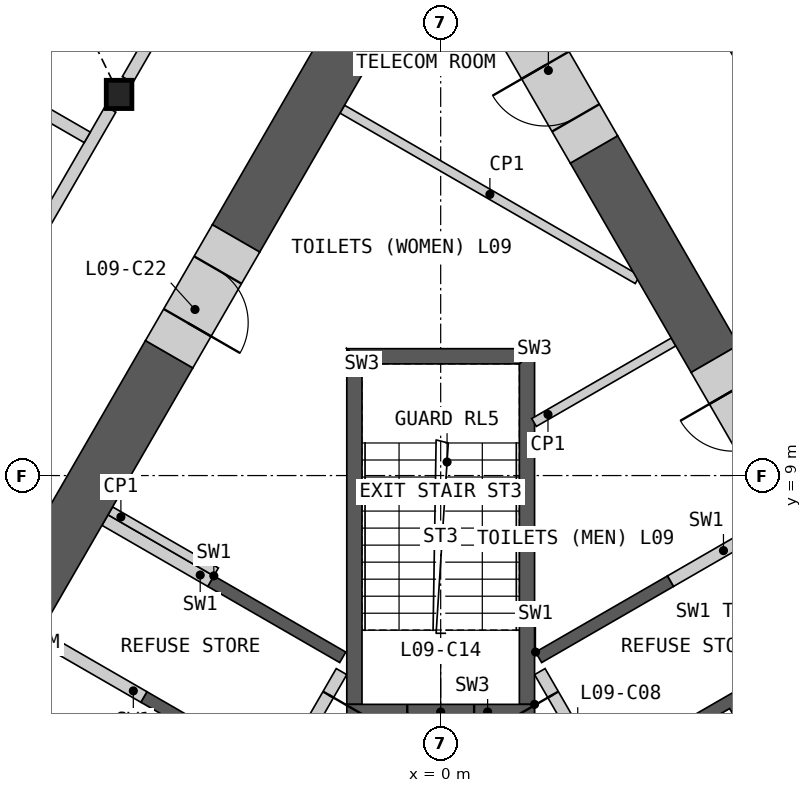
"""IFC4 building model, lengths in metres.
Left out: names, types, materials, properties, quantities, classifications, styles, units other than length and angle.
Written with IfcOpenShell. Run it as: python <this file> out.ifc"""

import sys

from ifc_helpers import new_model, si_unit, direction, frame, frame_2d, origin, origin_2d, place, context, subcontext, project, spatial, polyline, rectangle, i_section, outline, extrude, element, fill, save


model = new_model("IFC4")
c1 = context("Model", 3, precision=1e-05, world=origin(), true_north=direction((0.0, 1.0)))
c2 = subcontext(c1, "Body", "Model", "MODEL_VIEW")
j1 = project(units=[si_unit("LENGTHUNIT", "METRE"), si_unit("PLANEANGLEUNIT", "RADIAN")], contexts=[c1])
p1 = place(None, origin())
s1 = spatial("IfcSite", under=j1, at=p1, CompositionType="ELEMENT")
p2 = place(p1, origin())
s2 = spatial("IfcBuilding", under=s1, at=p2, CompositionType="ELEMENT")
p3 = place(p2, frame((0.0, 0.0, 46.8)))
s3 = spatial("IfcBuildingStorey", under=s2, at=p3, CompositionType="ELEMENT", Elevation=46.8)
p4 = place(p3, frame((-5.289, 15.269, 0.0), z_axis=(0.0, 0.0, 1.0), x_axis=(1.0, 0.0, 0.0)))
e1 = element("IfcColumn", 1, at=p4, inside=s3, PredefinedType="COLUMN", context=c2, shape_type="SweptSolid", body=[
    extrude(i_section(OverallWidth=0.421, OverallDepth=0.465, WebThickness=0.045, FlangeThickness=0.072, at=origin_2d()), origin(), (0.0, 0.0, 1.0), 4.2),
])
p5 = place(p3, origin())
e2 = element("IfcWall", 2, at=p5, inside=s3, PredefinedType="SHEAR", context=c2, shape_type="SweptSolid", body=[
    extrude(outline(polyline([(1.561, 6.097), (3.731, 7.35), (3.831, 7.177), (1.66, 5.924), (1.561, 6.097)])), origin(), (0.0, 0.0, 1.0), 3.8),
])
p6 = place(p3, origin())
e3 = element("IfcWall", 3, at=p6, inside=s3, PredefinedType="SHEAR", context=c2, shape_type="SweptSolid", body=[
    extrude(outline(polyline([(2.66, 4.192), (4.831, 5.445), (8.231, -0.444), (6.061, -1.697), (5.96, -1.524), (7.952, -0.374), (6.952, 1.358), (4.96, 0.208), (4.861, 0.381), (6.852, 1.531), (5.852, 3.263), (3.861, 2.113), (3.76, 2.287), (5.752, 3.437), (4.752, 5.169), (2.76, 4.019), (2.66, 4.192)])), origin(), (0.0, 0.0, 1.0), 3.8),
])
p7 = place(p3, frame((5.817, -1.476, 0.0), z_axis=(0.0, 0.0, 1.0), x_axis=(-0.500002616675, 0.866023893041, 0.0)))
e4 = element("IfcWall", 4, at=p7, inside=s3, PredefinedType="SOLIDWALL", context=c2, shape_type="SweptSolid", body=[
    extrude(rectangle(XDim=8.373, YDim=0.2, at=frame_2d((4.187, 0.0))), origin(), (0.0, 0.0, 1.0), 3.8),
])
p8 = place(p7, frame((0.337, 0.0, 0.0)))
e5 = element("IfcOpeningElement", 5, at=p8, cuts=e4, PredefinedType="OPENING", context=c2, shape_type="SweptSolid", body=[
    extrude(rectangle(XDim=1.1, YDim=2.1, at=frame_2d((0.55, 1.05))), frame((0.0, 0.11, 0.0), z_axis=(0.0, -1.0, 0.0), x_axis=(1.0, 0.0, 0.0)), (0.0, 0.0, 1.0), 0.22),
])
p9 = place(p7, frame((2.537, 0.0, 0.0)))
e6 = element("IfcOpeningElement", 6, at=p9, cuts=e4, PredefinedType="OPENING", context=c2, shape_type="SweptSolid", body=[
    extrude(rectangle(XDim=1.1, YDim=2.1, at=frame_2d((0.55, 1.05))), frame((0.0, 0.11, 0.0), z_axis=(0.0, -1.0, 0.0), x_axis=(1.0, 0.0, 0.0)), (0.0, 0.0, 1.0), 0.22),
])
p10 = place(p7, frame((4.737, 0.0, 0.0)))
e7 = element("IfcOpeningElement", 7, at=p10, cuts=e4, PredefinedType="OPENING", context=c2, shape_type="SweptSolid", body=[
    extrude(rectangle(XDim=1.1, YDim=2.1, at=frame_2d((0.55, 1.05))), frame((0.0, 0.11, 0.0), z_axis=(0.0, -1.0, 0.0), x_axis=(1.0, 0.0, 0.0)), (0.0, 0.0, 1.0), 0.22),
])
p11 = place(p7, frame((7.037, 0.0, 0.0)))
e8 = element("IfcOpeningElement", 8, at=p11, cuts=e4, PredefinedType="OPENING", context=c2, shape_type="SweptSolid", body=[
    extrude(rectangle(XDim=0.9, YDim=2.1, at=frame_2d((0.45, 1.05))), frame((0.0, 0.11, 0.0), z_axis=(0.0, -1.0, 0.0), x_axis=(1.0, 0.0, 0.0)), (0.0, 0.0, 1.0), 0.22),
])
p12 = place(p3, frame((3.781, 7.263, 0.0), z_axis=(0.0, 0.0, 1.0), x_axis=(0.865983199114, 0.50007309351, 0.0)))
e9 = element("IfcWall", 9, at=p12, inside=s3, PredefinedType="SHEAR", context=c2, shape_type="SweptSolid", body=[
    extrude(rectangle(XDim=2.009, YDim=0.2, at=frame_2d((1.004, 0.0))), origin(), (0.0, 0.0, 1.0), 3.8),
])
p13 = place(p3, origin())
e10 = element("IfcWall", 10, at=p13, inside=s3, PredefinedType="SHEAR", context=c2, shape_type="SweptSolid", body=[
    extrude(outline(polyline([(-2.76, 4.019), (-4.931, 5.272), (-4.831, 5.445), (-2.66, 4.192), (-2.76, 4.019)])), origin(), (0.0, 0.0, 1.0), 3.8),
])
p14 = place(p3, origin())
e11 = element("IfcWall", 11, at=p14, inside=s3, PredefinedType="SHEAR", context=c2, shape_type="SweptSolid", body=[
    extrude(outline(polyline([(-3.731, 7.35), (-1.561, 6.097), (-1.66, 5.924), (-3.831, 7.177), (-3.731, 7.35)])), origin(), (0.0, 0.0, 1.0), 3.8),
])
p15 = place(p3, frame((-1.631, 5.776, 0.0), z_axis=(0.0, 0.0, 1.0), x_axis=(-0.499992876559, -0.866029516466, 0.0)))
e12 = element("IfcWall", 12, at=p15, inside=s3, PredefinedType="SOLIDWALL", context=c2, shape_type="SweptSolid", body=[
    extrude(rectangle(XDim=6.486, YDim=0.2, at=frame_2d((3.243, 0.0))), origin(), (0.0, 0.0, 1.0), 3.8),
])
p16 = place(p15, frame((0.437, 0.0, 0.0)))
e13 = element("IfcOpeningElement", 13, at=p16, cuts=e12, PredefinedType="OPENING", context=c2, shape_type="SweptSolid", body=[
    extrude(rectangle(XDim=0.9, YDim=2.1, at=frame_2d((0.45, 1.05))), frame((0.0, 0.11, 0.0), z_axis=(0.0, -1.0, 0.0), x_axis=(1.0, 0.0, 0.0)), (0.0, 0.0, 1.0), 0.22),
])
p17 = place(p15, frame((2.637, 0.0, 0.0)))
e14 = element("IfcOpeningElement", 14, at=p17, cuts=e12, PredefinedType="OPENING", context=c2, shape_type="SweptSolid", body=[
    extrude(rectangle(XDim=0.9, YDim=2.1, at=frame_2d((0.45, 1.05))), frame((0.0, 0.11, 0.0), z_axis=(0.0, -1.0, 0.0), x_axis=(1.0, 0.0, 0.0)), (0.0, 0.0, 1.0), 0.22),
])
p18 = place(p3, frame((-3.781, 7.263, 0.0), z_axis=(0.0, 0.0, 1.0), x_axis=(-0.865983199114, 0.50007309351, 0.0)))
e15 = element("IfcWall", 15, at=p18, inside=s3, PredefinedType="SHEAR", context=c2, shape_type="SweptSolid", body=[
    extrude(rectangle(XDim=2.009, YDim=0.2, at=frame_2d((1.004, 0.0))), origin(), (0.0, 0.0, 1.0), 3.8),
])
p19 = place(p3, frame((-4.881, 5.358, 0.0), z_axis=(0.0, 0.0, 1.0), x_axis=(-0.866035824272, 0.499981950752, 0.0)))
e16 = element("IfcWall", 16, at=p19, inside=s3, PredefinedType="SHEAR", context=c2, shape_type="SweptSolid", body=[
    extrude(rectangle(XDim=2.009, YDim=0.2, at=frame_2d((1.004, 0.0))), origin(), (0.0, 0.0, 1.0), 3.8),
])
p20 = place(p3, origin())
e17 = element("IfcWall", 17, at=p20, inside=s3, PredefinedType="SHEAR", context=c2, shape_type="SweptSolid", body=[
    extrude(outline(polyline([(1.544, 5.237), (1.544, 11.087), (1.294, 10.837), (1.294, 5.237), (1.544, 5.237)])), origin(), (0.0, 0.0, 1.0), 3.8),
])
p21 = place(p3, origin())
e18 = element("IfcWall", 18, at=p21, inside=s3, PredefinedType="SHEAR", context=c2, shape_type="SweptSolid", body=[
    extrude(outline(polyline([(1.544, 11.087), (-1.544, 11.087), (-1.294, 10.837), (1.294, 10.837), (1.544, 11.087)])), origin(), (0.0, 0.0, 1.0), 3.8),
])
p22 = place(p3, origin())
e19 = element("IfcWall", 19, at=p22, inside=s3, PredefinedType="SHEAR", context=c2, shape_type="SweptSolid", body=[
    extrude(outline(polyline([(-1.294, 10.837), (-1.544, 11.087), (-1.544, 5.237), (-1.294, 5.237), (-1.294, 10.837)])), origin(), (0.0, 0.0, 1.0), 3.8),
])
p23 = place(p3, frame((1.544, 5.112, 0.0), z_axis=(0.0, 0.0, 1.0), x_axis=(-1.0, 0.0, 0.0)))
e20 = element("IfcWall", 20, at=p23, inside=s3, PredefinedType="SHEAR", context=c2, shape_type="SweptSolid", body=[
    extrude(rectangle(XDim=3.088, YDim=0.25, at=frame_2d((1.544, 0.0))), origin(), (0.0, 0.0, 1.0), 3.8),
])
p24 = place(p23, frame((0.994, 0.0, 0.0)))
e21 = element("IfcOpeningElement", 21, at=p24, cuts=e20, PredefinedType="OPENING", context=c2, shape_type="SweptSolid", body=[
    extrude(rectangle(XDim=1.1, YDim=2.1, at=frame_2d((0.55, 1.05))), frame((0.0, 0.135, 0.0), z_axis=(0.0, -1.0, 0.0), x_axis=(1.0, 0.0, 0.0)), (0.0, 0.0, 1.0), 0.27),
])
p25 = place(p3, frame((-3.693, 7.415, 0.0), z_axis=(0.0, 0.0, 1.0), x_axis=(-0.866035824272, 0.499981950752, 0.0)))
e22 = element("IfcWall", 22, at=p25, inside=s3, PredefinedType="PARTITIONING", context=c2, shape_type="SweptSolid", body=[
    extrude(rectangle(XDim=2.009, YDim=0.15, at=frame_2d((1.004, 0.0))), origin(), (0.0, 0.0, 1.0), 3.8),
])
p26 = place(p3, frame((3.829, 11.197, 0.0), z_axis=(0.0, 0.0, 1.0), x_axis=(-0.866016748302, -0.500014991436, 0.0)))
e23 = element("IfcWall", 23, at=p26, inside=s3, PredefinedType="PARTITIONING", context=c2, shape_type="SweptSolid", body=[
    extrude(rectangle(XDim=2.649, YDim=0.15, at=frame_2d((1.324, 0.0))), origin(), (0.0, 0.0, 1.0), 3.8),
])
p27 = place(p3, frame((-1.619, 15.026, 0.0), z_axis=(0.0, 0.0, 1.0), x_axis=(0.866015917575, -0.500016430238, 0.0)))
e24 = element("IfcWall", 24, at=p27, inside=s3, PredefinedType="PARTITIONING", context=c2, shape_type="SweptSolid", body=[
    extrude(rectangle(XDim=5.607, YDim=0.15, at=frame_2d((2.804, 0.0))), origin(), (0.0, 0.0, 1.0), 3.8),
])
p28 = place(p3, frame((4.509, 10.921, 0.0), z_axis=(0.0, 0.0, 1.0), x_axis=(-0.49999004381, 0.866031151917, 0.0)))
e25 = element("IfcWall", 25, at=p28, inside=s3, PredefinedType="SHEAR", context=c2, shape_type="SweptSolid", body=[
    extrude(rectangle(XDim=3.975, YDim=0.9, at=frame_2d((1.988, 0.0))), origin(), (0.0, 0.0, 1.0), 3.8),
])
p29 = place(p3, frame((-4.466, 10.995, 0.0), z_axis=(0.0, 0.0, 1.0), x_axis=(-0.500012427149, -0.866018228848, 0.0)))
e26 = element("IfcWall", 26, at=p29, inside=s3, PredefinedType="SHEAR", context=c2, shape_type="SweptSolid", body=[
    extrude(rectangle(XDim=7.409, YDim=0.9, at=frame_2d((3.705, 0.0))), origin(), (0.0, 0.0, 1.0), 3.8),
])
p30 = place(p3, frame((-0.39, 18.055, 0.0), z_axis=(0.0, 0.0, 1.0), x_axis=(-0.499981657175, -0.86603599376, 0.0)))
e27 = element("IfcWall", 27, at=p30, inside=s3, PredefinedType="SHEAR", context=c2, shape_type="SweptSolid", body=[
    extrude(rectangle(XDim=5.952, YDim=0.9, at=frame_2d((2.976, 0.0))), origin(), (0.0, 0.0, 1.0), 3.8),
])
p31 = place(p3, frame((5.608, 9.016, 0.0), z_axis=(0.0, 0.0, 1.0), x_axis=(-0.499994660107, 0.866028486751, 0.0)))
e28 = element("IfcWall", 28, at=p31, inside=s3, PredefinedType="SHEAR", context=c2, shape_type="SweptSolid", body=[
    extrude(rectangle(XDim=2.2, YDim=0.9, at=frame_2d((1.1, 0.0))), origin(), (0.0, 0.0, 1.0), 3.8),
])
p32 = place(p31, frame((0.6, 0.0, 0.0)))
e29 = element("IfcOpeningElement", 29, at=p32, cuts=e28, PredefinedType="OPENING", context=c2, shape_type="SweptSolid", body=[
    extrude(rectangle(XDim=1.0, YDim=2.1, at=frame_2d((0.5, 1.05))), frame((0.0, 0.46, 0.0), z_axis=(0.0, -1.0, 0.0), x_axis=(1.0, 0.0, 0.0)), (0.0, 0.0, 1.0), 0.92),
])
p33 = place(p3, frame((-3.365, 12.9, 0.0), z_axis=(0.0, 0.0, 1.0), x_axis=(-0.500077893725, -0.86598042715, 0.0)))
e30 = element("IfcWall", 30, at=p33, inside=s3, PredefinedType="SHEAR", context=c2, shape_type="SweptSolid", body=[
    extrude(rectangle(XDim=2.2, YDim=0.9, at=frame_2d((1.1, 0.0))), origin(), (0.0, 0.0, 1.0), 3.8),
])
p34 = place(p33, frame((0.6, 0.0, 0.0)))
e31 = element("IfcOpeningElement", 31, at=p34, cuts=e30, PredefinedType="OPENING", context=c2, shape_type="SweptSolid", body=[
    extrude(rectangle(XDim=1.0, YDim=2.1, at=frame_2d((0.5, 1.05))), frame((0.0, 0.46, 0.0), z_axis=(0.0, -1.0, 0.0), x_axis=(1.0, 0.0, 0.0)), (0.0, 0.0, 1.0), 0.92),
])
p35 = place(p3, frame((2.521, 14.364, 0.0), z_axis=(0.0, 0.0, 1.0), x_axis=(-0.50002983664, 0.866008176907, 0.0)))
e32 = element("IfcWall", 32, at=p35, inside=s3, PredefinedType="SHEAR", context=c2, shape_type="SweptSolid", body=[
    extrude(rectangle(XDim=2.2, YDim=0.9, at=frame_2d((1.1, 0.0))), origin(), (0.0, 0.0, 1.0), 3.8),
])
p36 = place(p35, frame((0.6, 0.0, 0.0)))
e33 = element("IfcOpeningElement", 33, at=p36, cuts=e32, PredefinedType="OPENING", context=c2, shape_type="SweptSolid", body=[
    extrude(rectangle(XDim=1.0, YDim=2.1, at=frame_2d((0.5, 1.05))), frame((0.0, 0.46, 0.0), z_axis=(0.0, -1.0, 0.0), x_axis=(1.0, 0.0, 0.0)), (0.0, 0.0, 1.0), 0.92),
])
p37 = place(p3, frame((-10.439, 6.35, 0.0), z_axis=(0.0, 0.0, 1.0), x_axis=(0.50001002959, 0.86601961312, 0.0)))
e34 = element("IfcWall", 34, at=p37, inside=s3, PredefinedType="PARTITIONING", context=c2, shape_type="SweptSolid", body=[
    extrude(rectangle(XDim=10.019, YDim=0.2, at=frame_2d((5.009, 0.0))), origin(), (0.0, 0.0, 1.0), 3.8),
])
p38 = place(p37, frame((4.159, 0.0, 0.0)))
e35 = element("IfcOpeningElement", 35, at=p38, cuts=e34, PredefinedType="OPENING", context=c2, shape_type="SweptSolid", body=[
    extrude(rectangle(XDim=1.0, YDim=2.1, at=frame_2d((0.5, 1.05))), frame((0.0, 0.11, 0.0), z_axis=(0.0, -1.0, 0.0), x_axis=(1.0, 0.0, 0.0)), (0.0, 0.0, 1.0), 0.22),
])
p39 = place(p3, frame((1.913, 21.116, 0.0), z_axis=(0.0, 0.0, 1.0), x_axis=(0.500001069878, -0.866024786089, 0.0)))
e36 = element("IfcWall", 36, at=p39, inside=s3, PredefinedType="PARTITIONING", context=c2, shape_type="SweptSolid", body=[
    extrude(rectangle(XDim=6.473, YDim=0.2, at=frame_2d((3.236, 0.0))), origin(), (0.0, 0.0, 1.0), 3.8),
])
p40 = place(p39, frame((2.787, 0.0, 0.0)))
e37 = element("IfcOpeningElement", 37, at=p40, cuts=e36, PredefinedType="OPENING", context=c2, shape_type="SweptSolid", body=[
    extrude(rectangle(XDim=1.0, YDim=2.1, at=frame_2d((0.5, 1.05))), frame((0.0, 0.11, 0.0), z_axis=(0.0, -1.0, 0.0), x_axis=(1.0, 0.0, 0.0)), (0.0, 0.0, 1.0), 0.22),
])
p41 = place(p3, frame((-5.149, 15.511, 0.0), z_axis=(0.0, 0.0, 1.0), x_axis=(0.500001069878, 0.866024786089, 0.0)))
e38 = element("IfcWall", 38, at=p41, inside=s3, PredefinedType="PARTITIONING", context=c2, shape_type="SweptSolid", body=[
    extrude(rectangle(XDim=6.473, YDim=0.2, at=frame_2d((3.236, 0.0))), origin(), (0.0, 0.0, 1.0), 3.8),
])
p42 = place(p41, frame((2.686, 0.0, 0.0)))
e39 = element("IfcOpeningElement", 39, at=p42, cuts=e38, PredefinedType="OPENING", context=c2, shape_type="SweptSolid", body=[
    extrude(rectangle(XDim=1.0, YDim=2.1, at=frame_2d((0.5, 1.05))), frame((0.0, 0.11, 0.0), z_axis=(0.0, -1.0, 0.0), x_axis=(1.0, 0.0, 0.0)), (0.0, 0.0, 1.0), 0.22),
])
p43 = place(p3, frame((-17.061, 21.057, 0.0), z_axis=(0.0, 0.0, 1.0), x_axis=(0.866020631549, -0.500008265664, 0.0)))
e40 = element("IfcWall", 40, at=p43, inside=s3, PredefinedType="PARTITIONING", context=c2, shape_type="SweptSolid", body=[
    extrude(rectangle(XDim=12.989, YDim=0.2, at=frame_2d((6.495, 0.0))), origin(), (0.0, 0.0, 1.0), 2.885),
])
p44 = place(p11, origin())
e41 = element("IfcDoor", 41, at=p44, inside=s3, OperationType="SINGLE_SWING_RIGHT", PredefinedType="DOOR", context=c2, shape_type="SweptSolid", body=[
    extrude(rectangle(XDim=0.9, YDim=2.1, at=frame_2d((0.45, 1.05))), frame((0.0, 0.025, 0.0), z_axis=(0.0, -1.0, 0.0), x_axis=(1.0, 0.0, 0.0)), (0.0, 0.0, 1.0), 0.05),
])
fill(e8, e41)
p45 = place(p16, origin())
e42 = element("IfcDoor", 42, at=p45, inside=s3, OperationType="SINGLE_SWING_LEFT", PredefinedType="DOOR", context=c2, shape_type="SweptSolid", body=[
    extrude(rectangle(XDim=0.9, YDim=2.1, at=frame_2d((0.45, 1.05))), frame((0.0, 0.025, 0.0), z_axis=(0.0, -1.0, 0.0), x_axis=(1.0, 0.0, 0.0)), (0.0, 0.0, 1.0), 0.05),
])
fill(e13, e42)
p46 = place(p24, origin())
e43 = element("IfcDoor", 43, at=p46, inside=s3, OperationType="SINGLE_SWING_RIGHT", PredefinedType="DOOR", context=c2, shape_type="SweptSolid", body=[
    extrude(rectangle(XDim=1.1, YDim=2.1, at=frame_2d((0.55, 1.05))), frame((0.0, 0.025, 0.0), z_axis=(0.0, -1.0, 0.0), x_axis=(1.0, 0.0, 0.0)), (0.0, 0.0, 1.0), 0.05),
])
fill(e21, e43)
p47 = place(p32, origin())
e44 = element("IfcDoor", 44, at=p47, inside=s3, OperationType="SINGLE_SWING_RIGHT", PredefinedType="DOOR", context=c2, shape_type="SweptSolid", body=[
    extrude(rectangle(XDim=1.0, YDim=2.1, at=frame_2d((0.5, 1.05))), frame((0.0, 0.205, 0.0), z_axis=(0.0, -1.0, 0.0), x_axis=(1.0, 0.0, 0.0)), (0.0, 0.0, 1.0), 0.05),
])
fill(e29, e44)
p48 = place(p34, origin())
e45 = element("IfcDoor", 45, at=p48, inside=s3, OperationType="SINGLE_SWING_RIGHT", PredefinedType="DOOR", context=c2, shape_type="SweptSolid", body=[
    extrude(rectangle(XDim=1.0, YDim=2.1, at=frame_2d((0.5, 1.05))), frame((0.0, 0.205, 0.0), z_axis=(0.0, -1.0, 0.0), x_axis=(1.0, 0.0, 0.0)), (0.0, 0.0, 1.0), 0.05),
])
fill(e31, e45)
p49 = place(p36, origin())
e46 = element("IfcDoor", 46, at=p49, inside=s3, OperationType="SINGLE_SWING_RIGHT", PredefinedType="DOOR", context=c2, shape_type="SweptSolid", body=[
    extrude(rectangle(XDim=1.0, YDim=2.1, at=frame_2d((0.5, 1.05))), frame((0.0, 0.205, 0.0), z_axis=(0.0, -1.0, 0.0), x_axis=(1.0, 0.0, 0.0)), (0.0, 0.0, 1.0), 0.05),
])
fill(e33, e46)
save(model, sys.argv[1])
